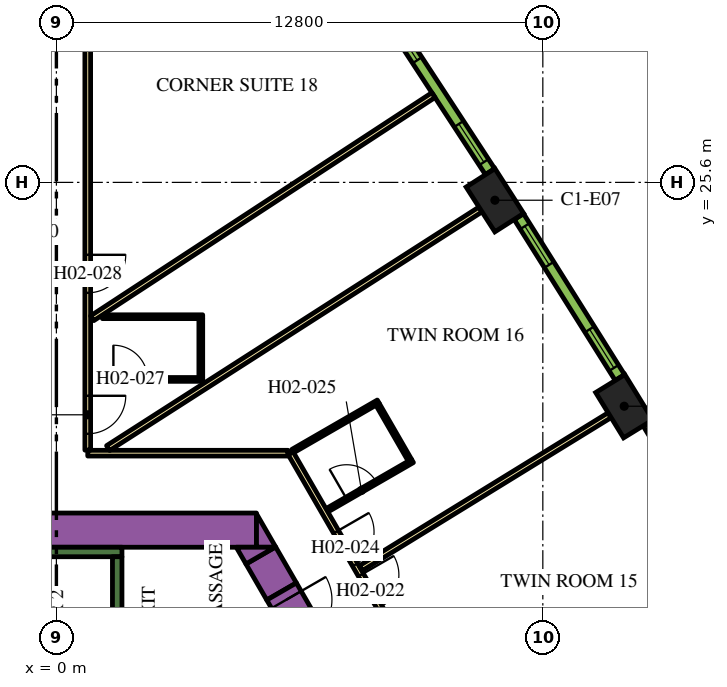
"""IFC4 building model, lengths in metres.
Left out: names, types, materials, properties, quantities, classifications, styles, units other than length and angle.
Written with IfcOpenShell. Run it as: python <this file> out.ifc"""

import sys

from ifc_helpers import new_model, si_unit, direction, frame, frame_2d, origin, origin_2d, place, context, subcontext, project, spatial, polyline, rectangle, outline, extrude, element, fill, save


model = new_model("IFC4")
c1 = context("Model", 3, precision=1e-05, world=origin(), true_north=direction((0.0, 1.0)))
c2 = subcontext(c1, "Body", "Model", "MODEL_VIEW")
j1 = project(units=[si_unit("LENGTHUNIT", "METRE"), si_unit("PLANEANGLEUNIT", "RADIAN")], contexts=[c1])
p1 = place(None, origin())
s1 = spatial("IfcSite", under=j1, at=p1, CompositionType="ELEMENT")
p2 = place(p1, origin())
s2 = spatial("IfcBuilding", under=s1, at=p2, CompositionType="ELEMENT")
p3 = place(p2, frame((0.0, 0.0, 47.1)))
s3 = spatial("IfcBuildingStorey", under=s2, at=p3, CompositionType="ELEMENT", Elevation=47.1)
for number, where, z_axis, x_axis in (
    (1, (14.942, 19.71, 0.0), (0.0, 0.0, 1.0), (-0.524, 0.852, 0.0)),
    (2, (11.539, 25.131, 0.0), (0.0, 0.0, 1.0), (-0.539, 0.842, 0.0)),
):
    element("IfcColumn", number, at=place(p3, frame(where, z_axis=z_axis, x_axis=x_axis)), inside=s3, PredefinedType="COLUMN", context=c2, shape_type="SweptSolid", body=[
        extrude(rectangle(XDim=1.4, YDim=0.9, at=origin_2d()), origin(), (0.0, 0.0, 1.0), 3.9),
    ])
p4 = place(p3, frame((-4.224, 16.45, 0.0), z_axis=(0.0, 0.0, 1.0), x_axis=(1.0, 0.0, 0.0)))
e3 = element("IfcWall", 3, at=p4, inside=s3, PredefinedType="SOLIDWALL", context=c2, shape_type="SweptSolid", body=[
    extrude(rectangle(XDim=9.488, YDim=0.9, at=frame_2d((4.744, 0.0))), origin(), (0.0, 0.0, 1.0), 3.9),
])
p5 = place(p3, origin())
e4 = element("IfcWall", 4, at=p5, inside=s3, PredefinedType="SOLIDWALL", context=c2, shape_type="SweptSolid", body=[
    extrude(outline(polyline([(5.265, 16.0), (5.265, 16.88), (5.773, 16.0), (5.265, 16.0)])), origin(), (0.0, 0.0, 1.0), 3.9),
])
p6 = place(p3, frame((5.926, 14.836, 0.0), z_axis=(0.0, 0.0, 1.0), x_axis=(-0.500076735116, 0.865981096212, 0.0)))
e5 = element("IfcWall", 5, at=p6, inside=s3, PredefinedType="SOLIDWALL", context=c2, shape_type="SweptSolid", body=[
    extrude(rectangle(XDim=1.094, YDim=0.9, at=frame_2d((0.547, 0.0))), origin(), (0.0, 0.0, 1.0), 3.9),
])
e6 = element("IfcWall", 6, at=p5, inside=s3, PredefinedType="SOLIDWALL", context=c2, shape_type="SweptSolid", body=[
    extrude(outline(polyline([(4.734, 16.0), (5.75, 16.0), (4.988, 15.56), (4.734, 16.0)])), origin(), (0.0, 0.0, 1.0), 3.9),
])
p7 = place(p3, frame((-1.725, 15.875, 0.0), z_axis=(0.0, 0.0, 1.0), x_axis=(1.0, 0.0, 0.0)))
e7 = element("IfcWall", 7, at=p7, inside=s3, PredefinedType="SOLIDWALL", context=c2, shape_type="SweptSolid", body=[
    extrude(rectangle(XDim=3.45, YDim=0.25, at=frame_2d((1.725, 0.0))), origin(), (0.0, 0.0, 1.0), 3.9),
])
p8 = place(p3, frame((1.6, 8.95, 0.0), z_axis=(0.0, 0.0, 1.0), x_axis=(0.0, 1.0, 0.0)))
e8 = element("IfcWall", 8, at=p8, inside=s3, PredefinedType="SOLIDWALL", context=c2, shape_type="SweptSolid", body=[
    extrude(rectangle(XDim=6.8, YDim=0.25, at=frame_2d((3.4, 0.0))), origin(), (0.0, 0.0, 1.0), 3.9),
])
p9 = place(p3, frame((5.926, 14.836, 0.0), z_axis=(0.0, 0.0, 1.0), x_axis=(0.500062241894, -0.865989465428, 0.0)))
e9 = element("IfcWall", 9, at=p9, inside=s3, PredefinedType="SOLIDWALL", context=c2, shape_type="SweptSolid", body=[
    extrude(rectangle(XDim=1.7, YDim=0.9, at=frame_2d((0.85, 0.0))), origin(), (0.0, 0.0, 1.0), 3.9),
])
p10 = place(p9, frame((0.25, 0.0, 0.0)))
e10 = element("IfcOpeningElement", 10, at=p10, cuts=e9, PredefinedType="OPENING", context=c2, shape_type="SweptSolid", body=[
    extrude(rectangle(XDim=1.2, YDim=2.1, at=frame_2d((0.6, 1.05))), frame((0.0, 0.46, 0.0), z_axis=(0.0, -1.0, 0.0), x_axis=(1.0, 0.0, 0.0)), (0.0, 0.0, 1.0), 0.92),
])
p11 = place(p3, frame((6.163, 18.475, 0.0), z_axis=(0.0, 0.0, 1.0), x_axis=(0.500001317485, -0.866024643133, 0.0)))
e11 = element("IfcWall", 11, at=p11, inside=s3, PredefinedType="PARTITIONING", context=c2, shape_type="SweptSolid", body=[
    extrude(rectangle(XDim=25.767, YDim=0.15, at=frame_2d((12.883, 0.0))), origin(), (0.0, 0.0, 1.0), 2.75),
])
p12 = place(p11, frame((24.586, 0.0, 0.0)))
e12 = element("IfcOpeningElement", 12, at=p12, cuts=e11, PredefinedType="OPENING", context=c2, shape_type="SweptSolid", body=[
    extrude(rectangle(XDim=1.0, YDim=2.1, at=frame_2d((0.5, 1.05))), frame((0.0, 0.085, 0.0), z_axis=(0.0, -1.0, 0.0), x_axis=(1.0, 0.0, 0.0)), (0.0, 0.0, 1.0), 0.17),
])
p13 = place(p11, frame((16.196, 0.0, 0.0)))
e13 = element("IfcOpeningElement", 13, at=p13, cuts=e11, PredefinedType="OPENING", context=c2, shape_type="SweptSolid", body=[
    extrude(rectangle(XDim=1.0, YDim=2.1, at=frame_2d((0.5, 1.05))), frame((0.0, 0.085, 0.0), z_axis=(0.0, -1.0, 0.0), x_axis=(1.0, 0.0, 0.0)), (0.0, 0.0, 1.0), 0.17),
])
p14 = place(p11, frame((14.789, 0.0, 0.0)))
e14 = element("IfcOpeningElement", 14, at=p14, cuts=e11, PredefinedType="OPENING", context=c2, shape_type="SweptSolid", body=[
    extrude(rectangle(XDim=1.1, YDim=2.1, at=frame_2d((0.55, 1.05))), frame((0.0, 0.085, 0.0), z_axis=(0.0, -1.0, 0.0), x_axis=(1.0, 0.0, 0.0)), (0.0, 0.0, 1.0), 0.17),
])
p15 = place(p11, frame((3.698, 0.0, 0.0)))
e15 = element("IfcOpeningElement", 15, at=p15, cuts=e11, PredefinedType="OPENING", context=c2, shape_type="SweptSolid", body=[
    extrude(rectangle(XDim=1.0, YDim=2.1, at=frame_2d((0.5, 1.05))), frame((0.0, 0.085, 0.0), z_axis=(0.0, -1.0, 0.0), x_axis=(1.0, 0.0, 0.0)), (0.0, 0.0, 1.0), 0.17),
])
p16 = place(p11, frame((2.391, 0.0, 0.0)))
e16 = element("IfcOpeningElement", 16, at=p16, cuts=e11, PredefinedType="OPENING", context=c2, shape_type="SweptSolid", body=[
    extrude(rectangle(XDim=1.0, YDim=2.1, at=frame_2d((0.5, 1.05))), frame((0.0, 0.085, 0.0), z_axis=(0.0, -1.0, 0.0), x_axis=(1.0, 0.0, 0.0)), (0.0, 0.0, 1.0), 0.17),
])
p17 = place(p3, frame((0.825, 18.475, 0.0), z_axis=(0.0, 0.0, 1.0), x_axis=(1.0, 0.0, 0.0)))
e17 = element("IfcWall", 17, at=p17, inside=s3, PredefinedType="PARTITIONING", context=c2, shape_type="SweptSolid", body=[
    extrude(rectangle(XDim=5.268, YDim=0.15, at=frame_2d((2.634, 0.0))), origin(), (0.0, 0.0, 1.0), 2.75),
])
p18 = place(p3, frame((0.825, 34.699, 0.0), z_axis=(0.0, 0.0, 1.0), x_axis=(0.0, -1.0, 0.0)))
e18 = element("IfcWall", 18, at=p18, inside=s3, PredefinedType="PARTITIONING", context=c2, shape_type="SweptSolid", body=[
    extrude(rectangle(XDim=16.144, YDim=0.15, at=frame_2d((8.072, 0.0))), origin(), (0.0, 0.0, 1.0), 2.75),
])
p19 = place(p18, frame((14.714, 0.0, 0.0)))
e19 = element("IfcOpeningElement", 19, at=p19, cuts=e18, PredefinedType="OPENING", context=c2, shape_type="SweptSolid", body=[
    extrude(rectangle(XDim=1.0, YDim=2.1, at=frame_2d((0.5, 1.05))), frame((0.0, 0.085, 0.0), z_axis=(0.0, -1.0, 0.0), x_axis=(1.0, 0.0, 0.0)), (0.0, 0.0, 1.0), 0.17),
])
p20 = place(p18, frame((11.005, 0.0, 0.0)))
e20 = element("IfcOpeningElement", 20, at=p20, cuts=e18, PredefinedType="OPENING", context=c2, shape_type="SweptSolid", body=[
    extrude(rectangle(XDim=1.0, YDim=2.1, at=frame_2d((0.5, 1.05))), frame((0.0, 0.085, 0.0), z_axis=(0.0, -1.0, 0.0), x_axis=(1.0, 0.0, 0.0)), (0.0, 0.0, 1.0), 0.17),
])
p21 = place(p3, frame((9.922, 27.896, 0.0), z_axis=(0.0, 0.0, 1.0), x_axis=(-0.836970816595, -0.547247523675, 0.0)))
e21 = element("IfcWall", 21, at=p21, inside=s3, PredefinedType="PARTITIONING", context=c2, shape_type="SweptSolid", body=[
    extrude(rectangle(XDim=10.729, YDim=0.15, at=frame_2d((5.364, 0.0))), origin(), (0.0, 0.0, 1.0), 2.75),
])
p22 = place(p3, frame((11.16, 24.888, 0.0), z_axis=(0.0, 0.0, 1.0), x_axis=(-0.84199813156, -0.539480441211, 0.0)))
e22 = element("IfcWall", 22, at=p22, inside=s3, PredefinedType="PARTITIONING", context=c2, shape_type="SweptSolid", body=[
    extrude(rectangle(XDim=11.638, YDim=0.15, at=frame_2d((5.819, 0.0))), origin(), (0.0, 0.0, 1.0), 2.75),
])
p23 = place(p3, frame((14.558, 19.475, 0.0), z_axis=(0.0, 0.0, 1.0), x_axis=(-0.851829455142, -0.523819223925, 0.0)))
e23 = element("IfcWall", 23, at=p23, inside=s3, PredefinedType="PARTITIONING", context=c2, shape_type="SweptSolid", body=[
    extrude(rectangle(XDim=7.688, YDim=0.15, at=frame_2d((3.844, 0.0))), origin(), (0.0, 0.0, 1.0), 2.75),
])
p24 = place(p3, frame((7.118, 16.971, 0.0), z_axis=(0.0, 0.0, 1.0), x_axis=(0.866021400173, 0.500006934395, 0.0)))
e24 = element("IfcWall", 24, at=p24, inside=s3, PredefinedType="PARTITIONING", context=c2, shape_type="SweptSolid", body=[
    extrude(rectangle(XDim=2.6, YDim=0.1, at=frame_2d((1.3, 0.0))), origin(), (0.0, 0.0, 1.0), 2.75),
])
p25 = place(p24, frame((0.6, 0.0, 0.0)))
e25 = element("IfcOpeningElement", 25, at=p25, cuts=e24, PredefinedType="OPENING", context=c2, shape_type="SweptSolid", body=[
    extrude(rectangle(XDim=0.9, YDim=2.1, at=frame_2d((0.45, 1.05))), frame((0.0, 0.06, 0.0), z_axis=(0.0, -1.0, 0.0), x_axis=(1.0, 0.0, 0.0)), (0.0, 0.0, 1.0), 0.12),
])
p26 = place(p3, frame((9.302, 18.289, 0.0), z_axis=(0.0, 0.0, 1.0), x_axis=(-0.500062241894, 0.865989465428, 0.0)))
e26 = element("IfcWall", 26, at=p26, inside=s3, PredefinedType="PARTITIONING", context=c2, shape_type="SweptSolid", body=[
    extrude(rectangle(XDim=1.7, YDim=0.1, at=frame_2d((0.85, 0.0))), origin(), (0.0, 0.0, 1.0), 2.75),
])
p27 = place(p3, frame((6.218, 18.53, 0.0), z_axis=(0.0, 0.0, 1.0), x_axis=(0.865997922154, 0.500047596559, 0.0)))
e27 = element("IfcWall", 27, at=p27, inside=s3, PredefinedType="PARTITIONING", context=c2, shape_type="SweptSolid", body=[
    extrude(rectangle(XDim=2.6, YDim=0.1, at=frame_2d((1.3, 0.0))), origin(), (0.0, 0.0, 1.0), 2.75),
])
p28 = place(p3, frame((0.9, 20.416, 0.0), z_axis=(0.0, 0.0, 1.0), x_axis=(1.0, 0.0, 0.0)))
e28 = element("IfcWall", 28, at=p28, inside=s3, PredefinedType="PARTITIONING", context=c2, shape_type="SweptSolid", body=[
    extrude(rectangle(XDim=2.95, YDim=0.1, at=frame_2d((1.475, 0.0))), origin(), (0.0, 0.0, 1.0), 2.75),
])
p29 = place(p28, frame((0.6, 0.0, 0.0)))
e29 = element("IfcOpeningElement", 29, at=p29, cuts=e28, PredefinedType="OPENING", context=c2, shape_type="SweptSolid", body=[
    extrude(rectangle(XDim=0.9, YDim=2.1, at=frame_2d((0.45, 1.05))), frame((0.0, 0.06, 0.0), z_axis=(0.0, -1.0, 0.0), x_axis=(1.0, 0.0, 0.0)), (0.0, 0.0, 1.0), 0.12),
])
p30 = place(p3, frame((3.8, 20.466, 0.0), z_axis=(0.0, 0.0, 1.0), x_axis=(0.0, 1.0, 0.0)))
e30 = element("IfcWall", 30, at=p30, inside=s3, PredefinedType="PARTITIONING", context=c2, shape_type="SweptSolid", body=[
    extrude(rectangle(XDim=1.55, YDim=0.1, at=frame_2d((0.775, 0.0))), origin(), (0.0, 0.0, 1.0), 2.75),
])
p31 = place(p3, frame((1.21, 22.066, 0.0), z_axis=(0.0, 0.0, 1.0), x_axis=(1.0, 0.0, 0.0)))
e31 = element("IfcWall", 31, at=p31, inside=s3, PredefinedType="PARTITIONING", context=c2, shape_type="SweptSolid", body=[
    extrude(rectangle(XDim=2.64, YDim=0.1, at=frame_2d((1.32, 0.0))), origin(), (0.0, 0.0, 1.0), 2.75),
])
p32 = place(p3, frame((18.143, 14.986, 0.0), z_axis=(0.0, 0.0, 1.0), x_axis=(-0.515938796285, 0.856625448191, 0.0)))
e32 = element("IfcWall", 32, at=p32, inside=s3, PredefinedType="SOLIDWALL", context=c2, shape_type="SweptSolid", body=[
    extrude(rectangle(XDim=4.998, YDim=0.29, at=frame_2d((2.499, 0.0))), origin(), (0.0, 0.0, 1.0), 3.65),
])
p33 = place(p32, frame((0.297, 0.0, 0.9)))
e33 = element("IfcOpeningElement", 33, at=p33, cuts=e32, PredefinedType="OPENING", context=c2, shape_type="SweptSolid", body=[
    extrude(rectangle(XDim=1.2, YDim=2.15, at=frame_2d((0.6, 1.075))), frame((0.0, 0.155, 0.0), z_axis=(0.0, -1.0, 0.0), x_axis=(1.0, 0.0, 0.0)), (0.0, 0.0, 1.0), 0.31),
])
p34 = place(p32, frame((3.501, 0.0, 0.9)))
e34 = element("IfcOpeningElement", 34, at=p34, cuts=e32, PredefinedType="OPENING", context=c2, shape_type="SweptSolid", body=[
    extrude(rectangle(XDim=1.2, YDim=2.15, at=frame_2d((0.6, 1.075))), frame((0.0, 0.155, 0.0), z_axis=(0.0, -1.0, 0.0), x_axis=(1.0, 0.0, 0.0)), (0.0, 0.0, 1.0), 0.31),
])
p35 = place(p3, frame((14.827, 20.466, 0.0), z_axis=(0.0, 0.0, 1.0), x_axis=(-0.531688286542, 0.846940119462, 0.0)))
e35 = element("IfcWall", 35, at=p35, inside=s3, PredefinedType="SOLIDWALL", context=c2, shape_type="SweptSolid", body=[
    extrude(rectangle(XDim=4.998, YDim=0.29, at=frame_2d((2.499, 0.0))), origin(), (0.0, 0.0, 1.0), 3.65),
])
p36 = place(p35, frame((0.297, 0.0, 0.9)))
e36 = element("IfcOpeningElement", 36, at=p36, cuts=e35, PredefinedType="OPENING", context=c2, shape_type="SweptSolid", body=[
    extrude(rectangle(XDim=1.2, YDim=2.15, at=frame_2d((0.6, 1.075))), frame((0.0, 0.155, 0.0), z_axis=(0.0, -1.0, 0.0), x_axis=(1.0, 0.0, 0.0)), (0.0, 0.0, 1.0), 0.31),
])
p37 = place(p35, frame((3.501, 0.0, 0.9)))
e37 = element("IfcOpeningElement", 37, at=p37, cuts=e35, PredefinedType="OPENING", context=c2, shape_type="SweptSolid", body=[
    extrude(rectangle(XDim=1.2, YDim=2.15, at=frame_2d((0.6, 1.075))), frame((0.0, 0.155, 0.0), z_axis=(0.0, -1.0, 0.0), x_axis=(1.0, 0.0, 0.0)), (0.0, 0.0, 1.0), 0.31),
])
p38 = place(p3, frame((11.411, 25.884, 0.0), z_axis=(0.0, 0.0, 1.0), x_axis=(-0.547204617628, 0.836998868845, 0.0)))
e38 = element("IfcWall", 38, at=p38, inside=s3, PredefinedType="SOLIDWALL", context=c2, shape_type="SweptSolid", body=[
    extrude(rectangle(XDim=4.998, YDim=0.29, at=frame_2d((2.499, 0.0))), origin(), (0.0, 0.0, 1.0), 3.65),
])
p39 = place(p38, frame((0.297, 0.0, 0.9)))
e39 = element("IfcOpeningElement", 39, at=p39, cuts=e38, PredefinedType="OPENING", context=c2, shape_type="SweptSolid", body=[
    extrude(rectangle(XDim=1.2, YDim=2.15, at=frame_2d((0.6, 1.075))), frame((0.0, 0.155, 0.0), z_axis=(0.0, -1.0, 0.0), x_axis=(1.0, 0.0, 0.0)), (0.0, 0.0, 1.0), 0.31),
])
p40 = place(p38, frame((3.501, 0.0, 0.9)))
e40 = element("IfcOpeningElement", 40, at=p40, cuts=e38, PredefinedType="OPENING", context=c2, shape_type="SweptSolid", body=[
    extrude(rectangle(XDim=1.2, YDim=2.15, at=frame_2d((0.6, 1.075))), frame((0.0, 0.155, 0.0), z_axis=(0.0, -1.0, 0.0), x_axis=(1.0, 0.0, 0.0)), (0.0, 0.0, 1.0), 0.31),
])
p41 = place(p10, origin())
e41 = element("IfcDoor", 41, at=p41, inside=s3, OperationType="SINGLE_SWING_LEFT", PredefinedType="DOOR", context=c2, shape_type="SweptSolid", body=[
    extrude(rectangle(XDim=1.2, YDim=2.1, at=frame_2d((0.6, 1.05))), frame((0.0, 0.025, 0.0), z_axis=(0.0, -1.0, 0.0), x_axis=(1.0, 0.0, 0.0)), (0.0, 0.0, 1.0), 0.05),
])
fill(e10, e41)
p42 = place(p15, origin())
e42 = element("IfcDoor", 42, at=p42, inside=s3, OperationType="SINGLE_SWING_LEFT", PredefinedType="DOOR", context=c2, shape_type="SweptSolid", body=[
    extrude(rectangle(XDim=1.0, YDim=2.1, at=frame_2d((0.5, 1.05))), frame((0.0, 0.025, 0.0), z_axis=(0.0, -1.0, 0.0), x_axis=(1.0, 0.0, 0.0)), (0.0, 0.0, 1.0), 0.05),
])
fill(e15, e42)
p43 = place(p16, origin())
e43 = element("IfcDoor", 43, at=p43, inside=s3, OperationType="SINGLE_SWING_RIGHT", PredefinedType="DOOR", context=c2, shape_type="SweptSolid", body=[
    extrude(rectangle(XDim=1.0, YDim=2.1, at=frame_2d((0.5, 1.05))), frame((0.0, 0.025, 0.0), z_axis=(0.0, -1.0, 0.0), x_axis=(1.0, 0.0, 0.0)), (0.0, 0.0, 1.0), 0.05),
])
fill(e16, e43)
p44 = place(p25, origin())
e44 = element("IfcDoor", 44, at=p44, inside=s3, OperationType="SINGLE_SWING_LEFT", PredefinedType="DOOR", context=c2, shape_type="SweptSolid", body=[
    extrude(rectangle(XDim=0.9, YDim=2.1, at=frame_2d((0.45, 1.05))), frame((0.0, 0.025, 0.0), z_axis=(0.0, -1.0, 0.0), x_axis=(1.0, 0.0, 0.0)), (0.0, 0.0, 1.0), 0.05),
])
fill(e25, e44)
p45 = place(p19, origin())
e45 = element("IfcDoor", 45, at=p45, inside=s3, OperationType="SINGLE_SWING_RIGHT", PredefinedType="DOOR", context=c2, shape_type="SweptSolid", body=[
    extrude(rectangle(XDim=1.0, YDim=2.1, at=frame_2d((0.5, 1.05))), frame((0.0, 0.025, 0.0), z_axis=(0.0, -1.0, 0.0), x_axis=(1.0, 0.0, 0.0)), (0.0, 0.0, 1.0), 0.05),
])
fill(e19, e45)
p46 = place(p29, origin())
e46 = element("IfcDoor", 46, at=p46, inside=s3, OperationType="SINGLE_SWING_LEFT", PredefinedType="DOOR", context=c2, shape_type="SweptSolid", body=[
    extrude(rectangle(XDim=0.9, YDim=2.1, at=frame_2d((0.45, 1.05))), frame((0.0, 0.025, 0.0), z_axis=(0.0, -1.0, 0.0), x_axis=(1.0, 0.0, 0.0)), (0.0, 0.0, 1.0), 0.05),
])
fill(e29, e46)
p47 = place(p20, origin())
e47 = element("IfcDoor", 47, at=p47, inside=s3, OperationType="SINGLE_SWING_RIGHT", PredefinedType="DOOR", context=c2, shape_type="SweptSolid", body=[
    extrude(rectangle(XDim=1.0, YDim=2.1, at=frame_2d((0.5, 1.05))), frame((0.0, 0.025, 0.0), z_axis=(0.0, -1.0, 0.0), x_axis=(1.0, 0.0, 0.0)), (0.0, 0.0, 1.0), 0.05),
])
fill(e20, e47)
p48 = place(p36, origin())
e48 = element("IfcWindow", 48, at=p48, inside=s3, PartitioningType="DOUBLE_PANEL_VERTICAL", PredefinedType="WINDOW", context=c2, shape_type="SweptSolid", body=[
    extrude(rectangle(XDim=1.2, YDim=2.15, at=frame_2d((0.6, 1.075))), frame((0.0, 0.015, 0.0), z_axis=(0.0, -1.0, 0.0), x_axis=(1.0, 0.0, 0.0)), (0.0, 0.0, 1.0), 0.06),
])
fill(e36, e48)
p49 = place(p37, origin())
e49 = element("IfcWindow", 49, at=p49, inside=s3, PartitioningType="DOUBLE_PANEL_VERTICAL", PredefinedType="WINDOW", context=c2, shape_type="SweptSolid", body=[
    extrude(rectangle(XDim=1.2, YDim=2.15, at=frame_2d((0.6, 1.075))), frame((0.0, 0.015, 0.0), z_axis=(0.0, -1.0, 0.0), x_axis=(1.0, 0.0, 0.0)), (0.0, 0.0, 1.0), 0.06),
])
fill(e37, e49)
p50 = place(p39, origin())
e50 = element("IfcWindow", 50, at=p50, inside=s3, PartitioningType="DOUBLE_PANEL_VERTICAL", PredefinedType="WINDOW", context=c2, shape_type="SweptSolid", body=[
    extrude(rectangle(XDim=1.2, YDim=2.15, at=frame_2d((0.6, 1.075))), frame((0.0, 0.015, 0.0), z_axis=(0.0, -1.0, 0.0), x_axis=(1.0, 0.0, 0.0)), (0.0, 0.0, 1.0), 0.06),
])
fill(e39, e50)
p51 = place(p40, origin())
e51 = element("IfcWindow", 51, at=p51, inside=s3, PartitioningType="DOUBLE_PANEL_VERTICAL", PredefinedType="WINDOW", context=c2, shape_type="SweptSolid", body=[
    extrude(rectangle(XDim=1.2, YDim=2.15, at=frame_2d((0.6, 1.075))), frame((0.0, 0.015, 0.0), z_axis=(0.0, -1.0, 0.0), x_axis=(1.0, 0.0, 0.0)), (0.0, 0.0, 1.0), 0.06),
])
fill(e40, e51)
save(model, sys.argv[1])
